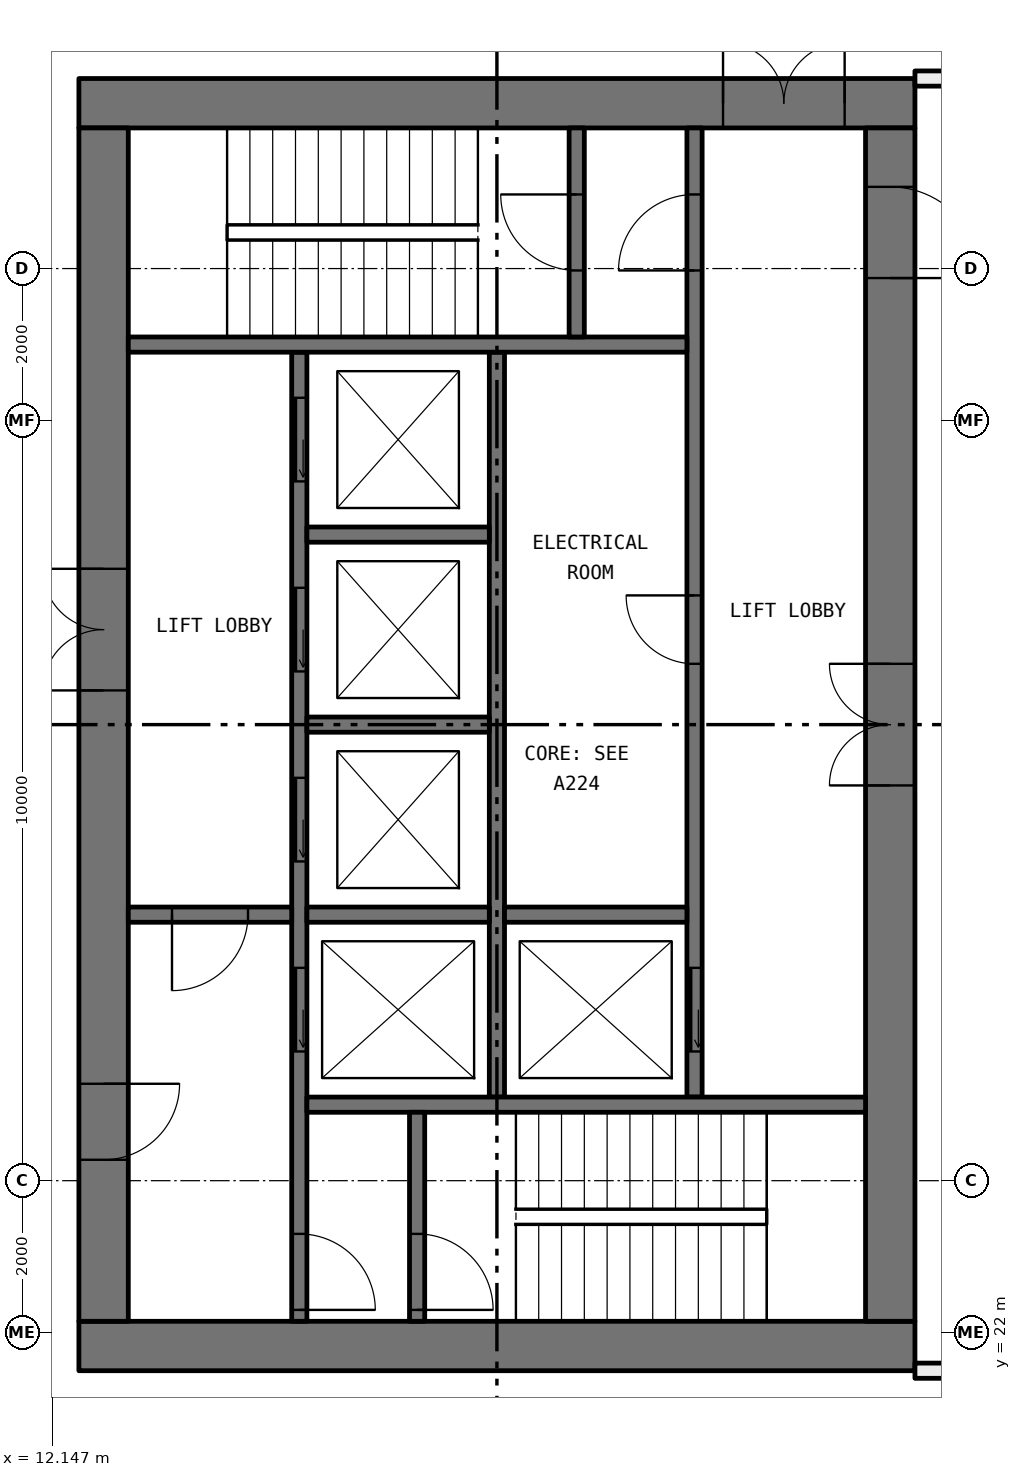
"""IFC4 building model, lengths in metres.
Left out: names, types, materials, properties, quantities, classifications, styles, units other than length and angle.
Written with IfcOpenShell. Run it as: python <this file> out.ifc"""

import sys

from ifc_helpers import new_model, si_unit, direction, frame, frame_2d, origin, place, context, subcontext, project, spatial, rectangle, extrude, element, fill, save


model = new_model("IFC4")
c1 = context("Model", 3, precision=1e-05, world=origin(), true_north=direction((0.0, 1.0)))
c2 = subcontext(c1, "Body", "Model", "MODEL_VIEW")
j1 = project(units=[si_unit("LENGTHUNIT", "METRE"), si_unit("PLANEANGLEUNIT", "RADIAN")], contexts=[c1])
p1 = place(None, origin())
s1 = spatial("IfcSite", under=j1, at=p1, CompositionType="ELEMENT")
p2 = place(p1, origin())
s2 = spatial("IfcBuilding", under=s1, at=p2, CompositionType="ELEMENT")
p3 = place(p2, frame((0.0, 0.0, 92.1)))
s3 = spatial("IfcBuildingStorey", under=s2, at=p3, CompositionType="ELEMENT", Elevation=92.1)
p4 = place(p3, frame((23.5, 21.5, 0.0), z_axis=(0.0, 0.0, 1.0), x_axis=(1.0, 0.0, 0.0)))
e1 = element("IfcWall", 1, at=p4, inside=s3, PredefinedType="PARTITIONING", context=c2, shape_type="SweptSolid", body=[
    extrude(rectangle(XDim=6.0, YDim=0.2, at=frame_2d((3.0, 0.0))), origin(), (0.0, 0.0, 1.0), 4.1),
])
p5 = place(p4, frame((2.55, 0.0, 0.0)))
e2 = element("IfcOpeningElement", 2, at=p5, cuts=e1, PredefinedType="OPENING", context=c2, shape_type="SweptSolid", body=[
    extrude(rectangle(XDim=0.9, YDim=2.1, at=frame_2d((0.45, 1.05))), frame((0.0, 0.11, 0.0), z_axis=(0.0, -1.0, 0.0), x_axis=(1.0, 0.0, 0.0)), (0.0, 0.0, 1.0), 0.22),
])
p6 = place(p3, frame((29.5, 38.5, 0.0), z_axis=(0.0, 0.0, 1.0), x_axis=(-1.0, 0.0, 0.0)))
e3 = element("IfcWall", 3, at=p6, inside=s3, PredefinedType="PARTITIONING", context=c2, shape_type="SweptSolid", body=[
    extrude(rectangle(XDim=6.0, YDim=0.2, at=frame_2d((3.0, 0.0))), origin(), (0.0, 0.0, 1.0), 4.1),
])
p7 = place(p3, frame((12.5, 21.825, 0.0), z_axis=(0.0, 0.0, 1.0), x_axis=(1.0, 0.0, 0.0)))
e4 = element("IfcWall", 4, at=p7, inside=s3, PredefinedType="SHEAR", context=c2, shape_type="SweptSolid", body=[
    extrude(rectangle(XDim=11.0, YDim=0.65, at=frame_2d((5.5, 0.0))), origin(), (0.0, 0.0, 1.0), 4.1),
])
p8 = place(p3, frame((12.5, 38.175, 0.0), z_axis=(0.0, 0.0, 1.0), x_axis=(1.0, 0.0, 0.0)))
e5 = element("IfcWall", 5, at=p8, inside=s3, PredefinedType="SHEAR", context=c2, shape_type="SweptSolid", body=[
    extrude(rectangle(XDim=11.0, YDim=0.65, at=frame_2d((5.5, 0.0))), origin(), (0.0, 0.0, 1.0), 4.1),
])
p9 = place(p8, frame((8.475, 0.0, 0.0)))
e6 = element("IfcOpeningElement", 6, at=p9, cuts=e5, PredefinedType="OPENING", context=c2, shape_type="SweptSolid", body=[
    extrude(rectangle(XDim=1.6, YDim=2.1, at=frame_2d((0.8, 1.05))), frame((0.0, 0.335, 0.0), z_axis=(0.0, -1.0, 0.0), x_axis=(1.0, 0.0, 0.0)), (0.0, 0.0, 1.0), 0.67),
])
p10 = place(p3, frame((12.825, 22.15, 0.0), z_axis=(0.0, 0.0, 1.0), x_axis=(0.0, 1.0, 0.0)))
e7 = element("IfcWall", 7, at=p10, inside=s3, PredefinedType="SHEAR", context=c2, shape_type="SweptSolid", body=[
    extrude(rectangle(XDim=15.7, YDim=0.65, at=frame_2d((7.85, 0.0))), origin(), (0.0, 0.0, 1.0), 4.1),
])
p11 = place(p10, frame((8.3, 0.0, 0.0)))
e8 = element("IfcOpeningElement", 8, at=p11, cuts=e7, PredefinedType="OPENING", context=c2, shape_type="SweptSolid", body=[
    extrude(rectangle(XDim=1.6, YDim=2.1, at=frame_2d((0.8, 1.05))), frame((0.0, 0.335, 0.0), z_axis=(0.0, -1.0, 0.0), x_axis=(1.0, 0.0, 0.0)), (0.0, 0.0, 1.0), 0.67),
])
p12 = place(p10, frame((2.125, 0.0, 0.0)))
e9 = element("IfcOpeningElement", 9, at=p12, cuts=e7, PredefinedType="OPENING", context=c2, shape_type="SweptSolid", body=[
    extrude(rectangle(XDim=1.0, YDim=2.1, at=frame_2d((0.5, 1.05))), frame((0.0, 0.335, 0.0), z_axis=(0.0, -1.0, 0.0), x_axis=(1.0, 0.0, 0.0)), (0.0, 0.0, 1.0), 0.67),
])
p13 = place(p3, frame((23.175, 22.15, 0.0), z_axis=(0.0, 0.0, 1.0), x_axis=(0.0, 1.0, 0.0)))
e10 = element("IfcWall", 10, at=p13, inside=s3, PredefinedType="SHEAR", context=c2, shape_type="SweptSolid", body=[
    extrude(rectangle(XDim=15.7, YDim=0.65, at=frame_2d((7.85, 0.0))), origin(), (0.0, 0.0, 1.0), 4.1),
])
p14 = place(p13, frame((7.05, 0.0, 0.0)))
e11 = element("IfcOpeningElement", 11, at=p14, cuts=e10, PredefinedType="OPENING", context=c2, shape_type="SweptSolid", body=[
    extrude(rectangle(XDim=1.6, YDim=2.1, at=frame_2d((0.8, 1.05))), frame((0.0, 0.335, 0.0), z_axis=(0.0, -1.0, 0.0), x_axis=(1.0, 0.0, 0.0)), (0.0, 0.0, 1.0), 0.67),
])
p15 = place(p13, frame((13.725, 0.0, 0.0)))
e12 = element("IfcOpeningElement", 12, at=p15, cuts=e10, PredefinedType="OPENING", context=c2, shape_type="SweptSolid", body=[
    extrude(rectangle(XDim=1.2, YDim=2.1, at=frame_2d((0.6, 1.05))), frame((0.0, 0.335, 0.0), z_axis=(0.0, -1.0, 0.0), x_axis=(1.0, 0.0, 0.0)), (0.0, 0.0, 1.0), 0.67),
])
p16 = place(p3, frame((15.4, 22.15, 0.0), z_axis=(0.0, 0.0, 1.0), x_axis=(0.0, 1.0, 0.0)))
e13 = element("IfcWall", 13, at=p16, inside=s3, PredefinedType="SOLIDWALL", context=c2, shape_type="SweptSolid", body=[
    extrude(rectangle(XDim=12.75, YDim=0.2, at=frame_2d((6.375, 0.0))), origin(), (0.0, 0.0, 1.0), 4.1),
])
p17 = place(p16, frame((3.55, 0.0, 0.0)))
e14 = element("IfcOpeningElement", 14, at=p17, cuts=e13, PredefinedType="OPENING", context=c2, shape_type="SweptSolid", body=[
    extrude(rectangle(XDim=1.1, YDim=2.1, at=frame_2d((0.55, 1.05))), frame((0.0, 0.11, 0.0), z_axis=(0.0, -1.0, 0.0), x_axis=(1.0, 0.0, 0.0)), (0.0, 0.0, 1.0), 0.22),
])
p18 = place(p16, frame((6.05, 0.0, 0.0)))
e15 = element("IfcOpeningElement", 15, at=p18, cuts=e13, PredefinedType="OPENING", context=c2, shape_type="SweptSolid", body=[
    extrude(rectangle(XDim=1.1, YDim=2.1, at=frame_2d((0.55, 1.05))), frame((0.0, 0.11, 0.0), z_axis=(0.0, -1.0, 0.0), x_axis=(1.0, 0.0, 0.0)), (0.0, 0.0, 1.0), 0.22),
])
p19 = place(p16, frame((8.55, 0.0, 0.0)))
e16 = element("IfcOpeningElement", 16, at=p19, cuts=e13, PredefinedType="OPENING", context=c2, shape_type="SweptSolid", body=[
    extrude(rectangle(XDim=1.1, YDim=2.1, at=frame_2d((0.55, 1.05))), frame((0.0, 0.11, 0.0), z_axis=(0.0, -1.0, 0.0), x_axis=(1.0, 0.0, 0.0)), (0.0, 0.0, 1.0), 0.22),
])
p20 = place(p16, frame((11.05, 0.0, 0.0)))
e17 = element("IfcOpeningElement", 17, at=p20, cuts=e13, PredefinedType="OPENING", context=c2, shape_type="SweptSolid", body=[
    extrude(rectangle(XDim=1.1, YDim=2.1, at=frame_2d((0.55, 1.05))), frame((0.0, 0.11, 0.0), z_axis=(0.0, -1.0, 0.0), x_axis=(1.0, 0.0, 0.0)), (0.0, 0.0, 1.0), 0.22),
])
p21 = place(p16, frame((0.15, 0.0, 0.0)))
e18 = element("IfcOpeningElement", 18, at=p21, cuts=e13, PredefinedType="OPENING", context=c2, shape_type="SweptSolid", body=[
    extrude(rectangle(XDim=1.0, YDim=2.1, at=frame_2d((0.5, 1.05))), frame((0.0, 0.11, 0.0), z_axis=(0.0, -1.0, 0.0), x_axis=(1.0, 0.0, 0.0)), (0.0, 0.0, 1.0), 0.22),
])
p22 = place(p3, frame((20.6, 25.1, 0.0), z_axis=(0.0, 0.0, 1.0), x_axis=(0.0, 1.0, 0.0)))
e19 = element("IfcWall", 19, at=p22, inside=s3, PredefinedType="SOLIDWALL", context=c2, shape_type="SweptSolid", body=[
    extrude(rectangle(XDim=12.75, YDim=0.2, at=frame_2d((6.375, 0.0))), origin(), (0.0, 0.0, 1.0), 4.1),
])
p23 = place(p22, frame((0.6, 0.0, 0.0)))
e20 = element("IfcOpeningElement", 20, at=p23, cuts=e19, PredefinedType="OPENING", context=c2, shape_type="SweptSolid", body=[
    extrude(rectangle(XDim=1.1, YDim=2.1, at=frame_2d((0.55, 1.05))), frame((0.0, 0.11, 0.0), z_axis=(0.0, -1.0, 0.0), x_axis=(1.0, 0.0, 0.0)), (0.0, 0.0, 1.0), 0.22),
])
p24 = place(p22, frame((10.875, 0.0, 0.0)))
e21 = element("IfcOpeningElement", 21, at=p24, cuts=e19, PredefinedType="OPENING", context=c2, shape_type="SweptSolid", body=[
    extrude(rectangle(XDim=1.0, YDim=2.1, at=frame_2d((0.5, 1.05))), frame((0.0, 0.11, 0.0), z_axis=(0.0, -1.0, 0.0), x_axis=(1.0, 0.0, 0.0)), (0.0, 0.0, 1.0), 0.22),
])
p25 = place(p22, frame((5.7, 0.0, 0.0)))
e22 = element("IfcOpeningElement", 22, at=p25, cuts=e19, PredefinedType="OPENING", context=c2, shape_type="SweptSolid", body=[
    extrude(rectangle(XDim=0.9, YDim=2.1, at=frame_2d((0.45, 1.05))), frame((0.0, 0.11, 0.0), z_axis=(0.0, -1.0, 0.0), x_axis=(1.0, 0.0, 0.0)), (0.0, 0.0, 1.0), 0.22),
])
p26 = place(p3, frame((18.0, 25.1, 0.0), z_axis=(0.0, 0.0, 1.0), x_axis=(0.0, 1.0, 0.0)))
e23 = element("IfcWall", 23, at=p26, inside=s3, PredefinedType="SOLIDWALL", context=c2, shape_type="SweptSolid", body=[
    extrude(rectangle(XDim=9.8, YDim=0.2, at=frame_2d((4.9, 0.0))), origin(), (0.0, 0.0, 1.0), 4.1),
])
for number, where, z_axis, x_axis in (
    (24, (15.5, 25.0, 0.0), (0.0, 0.0, 1.0), (1.0, 0.0, 0.0)),
    (25, (13.15, 35.0, 0.0), (0.0, 0.0, 1.0), (1.0, 0.0, 0.0)),
):
    element("IfcWall", number, at=place(p3, frame(where, z_axis=z_axis, x_axis=x_axis)), inside=s3, PredefinedType="SOLIDWALL", context=c2, shape_type="SweptSolid", body=[
        extrude(rectangle(XDim=7.35, YDim=0.2, at=frame_2d((3.675, 0.0))), origin(), (0.0, 0.0, 1.0), 4.1),
    ])
p27 = place(p3, frame((13.15, 27.5, 0.0), z_axis=(0.0, 0.0, 1.0), x_axis=(1.0, 0.0, 0.0)))
e26 = element("IfcWall", 26, at=p27, inside=s3, PredefinedType="SOLIDWALL", context=c2, shape_type="SweptSolid", body=[
    extrude(rectangle(XDim=2.15, YDim=0.2, at=frame_2d((1.075, 0.0))), origin(), (0.0, 0.0, 1.0), 4.1),
])
p28 = place(p27, frame((0.575, 0.0, 0.0)))
e27 = element("IfcOpeningElement", 27, at=p28, cuts=e26, PredefinedType="OPENING", context=c2, shape_type="SweptSolid", body=[
    extrude(rectangle(XDim=1.0, YDim=2.1, at=frame_2d((0.5, 1.05))), frame((0.0, 0.11, 0.0), z_axis=(0.0, -1.0, 0.0), x_axis=(1.0, 0.0, 0.0)), (0.0, 0.0, 1.0), 0.22),
])
p29 = place(p3, frame((16.95, 22.15, 0.0), z_axis=(0.0, 0.0, 1.0), x_axis=(0.0, 1.0, 0.0)))
e28 = element("IfcWall", 28, at=p29, inside=s3, PredefinedType="SOLIDWALL", context=c2, shape_type="SweptSolid", body=[
    extrude(rectangle(XDim=2.75, YDim=0.2, at=frame_2d((1.375, 0.0))), origin(), (0.0, 0.0, 1.0), 4.1),
])
p30 = place(p29, frame((0.15, 0.0, 0.0)))
e29 = element("IfcOpeningElement", 29, at=p30, cuts=e28, PredefinedType="OPENING", context=c2, shape_type="SweptSolid", body=[
    extrude(rectangle(XDim=1.0, YDim=2.1, at=frame_2d((0.5, 1.05))), frame((0.0, 0.11, 0.0), z_axis=(0.0, -1.0, 0.0), x_axis=(1.0, 0.0, 0.0)), (0.0, 0.0, 1.0), 0.22),
])
p31 = place(p3, frame((19.05, 35.1, 0.0), z_axis=(0.0, 0.0, 1.0), x_axis=(0.0, 1.0, 0.0)))
e30 = element("IfcWall", 30, at=p31, inside=s3, PredefinedType="SOLIDWALL", context=c2, shape_type="SweptSolid", body=[
    extrude(rectangle(XDim=2.75, YDim=0.2, at=frame_2d((1.375, 0.0))), origin(), (0.0, 0.0, 1.0), 4.1),
])
p32 = place(p31, frame((0.875, 0.0, 0.0)))
e31 = element("IfcOpeningElement", 31, at=p32, cuts=e30, PredefinedType="OPENING", context=c2, shape_type="SweptSolid", body=[
    extrude(rectangle(XDim=1.0, YDim=2.1, at=frame_2d((0.5, 1.05))), frame((0.0, 0.11, 0.0), z_axis=(0.0, -1.0, 0.0), x_axis=(1.0, 0.0, 0.0)), (0.0, 0.0, 1.0), 0.22),
])
for number, where, z_axis, x_axis in (
    (32, (15.5, 27.5, 0.0), (0.0, 0.0, 1.0), (1.0, 0.0, 0.0)),
    (33, (15.5, 30.0, 0.0), (0.0, 0.0, 1.0), (1.0, 0.0, 0.0)),
    (34, (15.5, 32.5, 0.0), (0.0, 0.0, 1.0), (1.0, 0.0, 0.0)),
    (35, (18.1, 27.5, 0.0), (0.0, 0.0, 1.0), (1.0, 0.0, 0.0)),
):
    element("IfcWall", number, at=place(p3, frame(where, z_axis=z_axis, x_axis=x_axis)), inside=s3, PredefinedType="SOLIDWALL", context=c2, shape_type="SweptSolid", body=[
        extrude(rectangle(XDim=2.4, YDim=0.2, at=frame_2d((1.2, 0.0))), origin(), (0.0, 0.0, 1.0), 4.1),
    ])
p33 = place(p23, origin())
e36 = element("IfcDoor", 36, at=p33, inside=s3, OperationType="SLIDING_TO_LEFT", PredefinedType="DOOR", context=c2, shape_type="SweptSolid", body=[
    extrude(rectangle(XDim=1.1, YDim=2.1, at=frame_2d((0.55, 1.05))), frame((0.0, 0.025, 0.0), z_axis=(0.0, -1.0, 0.0), x_axis=(1.0, 0.0, 0.0)), (0.0, 0.0, 1.0), 0.05),
])
fill(e20, e36)
p34 = place(p17, origin())
e37 = element("IfcDoor", 37, at=p34, inside=s3, OperationType="SLIDING_TO_LEFT", PredefinedType="DOOR", context=c2, shape_type="SweptSolid", body=[
    extrude(rectangle(XDim=1.1, YDim=2.1, at=frame_2d((0.55, 1.05))), frame((0.0, 0.025, 0.0), z_axis=(0.0, -1.0, 0.0), x_axis=(1.0, 0.0, 0.0)), (0.0, 0.0, 1.0), 0.05),
])
fill(e14, e37)
p35 = place(p18, origin())
e38 = element("IfcDoor", 38, at=p35, inside=s3, OperationType="SLIDING_TO_LEFT", PredefinedType="DOOR", context=c2, shape_type="SweptSolid", body=[
    extrude(rectangle(XDim=1.1, YDim=2.1, at=frame_2d((0.55, 1.05))), frame((0.0, 0.025, 0.0), z_axis=(0.0, -1.0, 0.0), x_axis=(1.0, 0.0, 0.0)), (0.0, 0.0, 1.0), 0.05),
])
fill(e15, e38)
p36 = place(p19, origin())
e39 = element("IfcDoor", 39, at=p36, inside=s3, OperationType="SLIDING_TO_LEFT", PredefinedType="DOOR", context=c2, shape_type="SweptSolid", body=[
    extrude(rectangle(XDim=1.1, YDim=2.1, at=frame_2d((0.55, 1.05))), frame((0.0, 0.025, 0.0), z_axis=(0.0, -1.0, 0.0), x_axis=(1.0, 0.0, 0.0)), (0.0, 0.0, 1.0), 0.05),
])
fill(e16, e39)
p37 = place(p20, origin())
e40 = element("IfcDoor", 40, at=p37, inside=s3, OperationType="SLIDING_TO_LEFT", PredefinedType="DOOR", context=c2, shape_type="SweptSolid", body=[
    extrude(rectangle(XDim=1.1, YDim=2.1, at=frame_2d((0.55, 1.05))), frame((0.0, 0.025, 0.0), z_axis=(0.0, -1.0, 0.0), x_axis=(1.0, 0.0, 0.0)), (0.0, 0.0, 1.0), 0.05),
])
fill(e17, e40)
p38 = place(p30, frame((1.0, 0.0, 0.0), x_axis=(-1.0, 0.0, 0.0)))
e41 = element("IfcDoor", 41, at=p38, inside=s3, OperationType="SINGLE_SWING_LEFT", PredefinedType="DOOR", context=c2, shape_type="SweptSolid", body=[
    extrude(rectangle(XDim=1.0, YDim=2.1, at=frame_2d((0.5, 1.05))), frame((0.0, 0.025, 0.0), z_axis=(0.0, -1.0, 0.0), x_axis=(1.0, 0.0, 0.0)), (0.0, 0.0, 1.0), 0.05),
])
fill(e29, e41)
p39 = place(p21, frame((1.0, 0.0, 0.0), x_axis=(-1.0, 0.0, 0.0)))
e42 = element("IfcDoor", 42, at=p39, inside=s3, OperationType="SINGLE_SWING_LEFT", PredefinedType="DOOR", context=c2, shape_type="SweptSolid", body=[
    extrude(rectangle(XDim=1.0, YDim=2.1, at=frame_2d((0.5, 1.05))), frame((0.0, 0.025, 0.0), z_axis=(0.0, -1.0, 0.0), x_axis=(1.0, 0.0, 0.0)), (0.0, 0.0, 1.0), 0.05),
])
fill(e18, e42)
p40 = place(p24, origin())
e43 = element("IfcDoor", 43, at=p40, inside=s3, OperationType="SINGLE_SWING_RIGHT", PredefinedType="DOOR", context=c2, shape_type="SweptSolid", body=[
    extrude(rectangle(XDim=1.0, YDim=2.1, at=frame_2d((0.5, 1.05))), frame((0.0, 0.025, 0.0), z_axis=(0.0, -1.0, 0.0), x_axis=(1.0, 0.0, 0.0)), (0.0, 0.0, 1.0), 0.05),
])
fill(e21, e43)
p41 = place(p32, origin())
e44 = element("IfcDoor", 44, at=p41, inside=s3, OperationType="SINGLE_SWING_LEFT", PredefinedType="DOOR", context=c2, shape_type="SweptSolid", body=[
    extrude(rectangle(XDim=1.0, YDim=2.1, at=frame_2d((0.5, 1.05))), frame((0.0, 0.025, 0.0), z_axis=(0.0, -1.0, 0.0), x_axis=(1.0, 0.0, 0.0)), (0.0, 0.0, 1.0), 0.05),
])
fill(e31, e44)
p42 = place(p28, frame((1.0, 0.0, 0.0), x_axis=(-1.0, 0.0, 0.0)))
e45 = element("IfcDoor", 45, at=p42, inside=s3, OperationType="SINGLE_SWING_LEFT", PredefinedType="DOOR", context=c2, shape_type="SweptSolid", body=[
    extrude(rectangle(XDim=1.0, YDim=2.1, at=frame_2d((0.5, 1.05))), frame((0.0, 0.025, 0.0), z_axis=(0.0, -1.0, 0.0), x_axis=(1.0, 0.0, 0.0)), (0.0, 0.0, 1.0), 0.05),
])
fill(e27, e45)
p43 = place(p11, origin())
e46 = element("IfcDoor", 46, at=p43, inside=s3, OperationType="DOUBLE_DOOR_SINGLE_SWING", PredefinedType="DOOR", context=c2, shape_type="SweptSolid", body=[
    extrude(rectangle(XDim=1.6, YDim=2.1, at=frame_2d((0.8, 1.05))), frame((0.0, 0.025, 0.0), z_axis=(0.0, -1.0, 0.0), x_axis=(1.0, 0.0, 0.0)), (0.0, 0.0, 1.0), 0.05),
])
fill(e8, e46)
p44 = place(p12, frame((1.0, 0.0, 0.0), x_axis=(-1.0, 0.0, 0.0)))
e47 = element("IfcDoor", 47, at=p44, inside=s3, OperationType="SINGLE_SWING_RIGHT", PredefinedType="DOOR", context=c2, shape_type="SweptSolid", body=[
    extrude(rectangle(XDim=1.0, YDim=2.1, at=frame_2d((0.5, 1.05))), frame((0.0, 0.025, 0.0), z_axis=(0.0, -1.0, 0.0), x_axis=(1.0, 0.0, 0.0)), (0.0, 0.0, 1.0), 0.05),
])
fill(e9, e47)
p45 = place(p9, origin())
e48 = element("IfcDoor", 48, at=p45, inside=s3, OperationType="DOUBLE_DOOR_SINGLE_SWING", PredefinedType="DOOR", context=c2, shape_type="SweptSolid", body=[
    extrude(rectangle(XDim=1.6, YDim=2.1, at=frame_2d((0.8, 1.05))), frame((0.0, 0.025, 0.0), z_axis=(0.0, -1.0, 0.0), x_axis=(1.0, 0.0, 0.0)), (0.0, 0.0, 1.0), 0.05),
])
fill(e6, e48)
p46 = place(p14, origin())
e49 = element("IfcDoor", 49, at=p46, inside=s3, OperationType="DOUBLE_DOOR_SINGLE_SWING", PredefinedType="DOOR", context=c2, shape_type="SweptSolid", body=[
    extrude(rectangle(XDim=1.6, YDim=2.1, at=frame_2d((0.8, 1.05))), frame((0.0, 0.025, 0.0), z_axis=(0.0, -1.0, 0.0), x_axis=(1.0, 0.0, 0.0)), (0.0, 0.0, 1.0), 0.05),
])
fill(e11, e49)
p47 = place(p15, frame((1.2, 0.0, 0.0), x_axis=(-1.0, 0.0, 0.0)))
e50 = element("IfcDoor", 50, at=p47, inside=s3, OperationType="SINGLE_SWING_LEFT", PredefinedType="DOOR", context=c2, shape_type="SweptSolid", body=[
    extrude(rectangle(XDim=1.2, YDim=2.1, at=frame_2d((0.6, 1.05))), frame((0.0, 0.025, 0.0), z_axis=(0.0, -1.0, 0.0), x_axis=(1.0, 0.0, 0.0)), (0.0, 0.0, 1.0), 0.05),
])
fill(e12, e50)
p48 = place(p25, origin())
e51 = element("IfcDoor", 51, at=p48, inside=s3, OperationType="SINGLE_SWING_LEFT", PredefinedType="DOOR", context=c2, shape_type="SweptSolid", body=[
    extrude(rectangle(XDim=0.9, YDim=2.1, at=frame_2d((0.45, 1.05))), frame((0.0, 0.025, 0.0), z_axis=(0.0, -1.0, 0.0), x_axis=(1.0, 0.0, 0.0)), (0.0, 0.0, 1.0), 0.05),
])
fill(e22, e51)
save(model, sys.argv[1])
